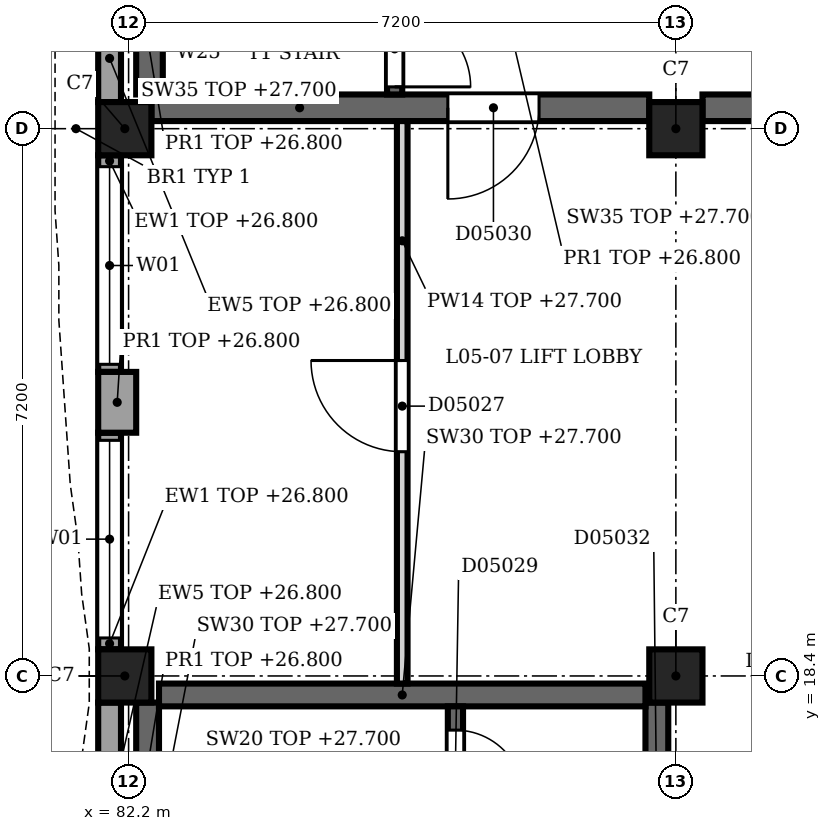
"""IFC4 building model, lengths in metres.
Left out: names, types, materials, properties, quantities, classifications, styles, units other than length and angle.
Written with IfcOpenShell. Run it as: python <this file> out.ifc"""

import sys

from ifc_helpers import new_model, si_unit, direction, frame, frame_2d, origin, origin_2d, place, context, subcontext, project, spatial, rectangle, extrude, element, fill, save


model = new_model("IFC4")
c1 = context("Model", 3, precision=1e-05, world=origin(), true_north=direction((0.0, 1.0)))
c2 = subcontext(c1, "Body", "Model", "MODEL_VIEW")
j1 = project(units=[si_unit("LENGTHUNIT", "METRE"), si_unit("PLANEANGLEUNIT", "RADIAN")], contexts=[c1])
p1 = place(None, origin())
s1 = spatial("IfcSite", under=j1, at=p1, CompositionType="ELEMENT")
p2 = place(p1, origin())
s2 = spatial("IfcBuilding", under=s1, at=p2, CompositionType="ELEMENT")
p3 = place(p2, frame((0.0, 0.0, 23.4)))
s3 = spatial("IfcBuildingStorey", under=s2, at=p3, CompositionType="ELEMENT", Elevation=23.4)
for number, where, z_axis, x_axis in (
    (1, (82.15, 18.4, 0.0), (0.0, 0.0, 1.0), (1.0, 0.0, 0.0)),
    (2, (82.15, 25.6, 0.0), (0.0, 0.0, 1.0), (1.0, 0.0, 0.0)),
    (3, (89.4, 18.4, 0.0), (0.0, 0.0, 1.0), (1.0, 0.0, 0.0)),
    (4, (89.4, 25.6, 0.0), (0.0, 0.0, 1.0), (1.0, 0.0, 0.0)),
):
    element("IfcColumn", number, at=place(p3, frame(where, z_axis=z_axis, x_axis=x_axis)), inside=s3, PredefinedType="COLUMN", context=c2, shape_type="SweptSolid", body=[
        extrude(rectangle(XDim=0.7, YDim=0.7, at=origin_2d()), origin(), (0.0, 0.0, 1.0), 4.5),
    ])
p4 = place(p3, frame((82.05, 21.6, 0.0), z_axis=(0.0, 0.0, 1.0), x_axis=(0.0, 1.0, 0.0)))
e5 = element("IfcWall", 5, at=p4, inside=s3, PredefinedType="SOLIDWALL", context=c2, shape_type="SweptSolid", body=[
    extrude(rectangle(XDim=0.8, YDim=0.5, at=frame_2d((0.4, 0.0))), origin(), (0.0, 0.0, 1.0), 3.4),
])
p5 = place(p3, frame((81.95, 15.2, 0.0), z_axis=(0.0, 0.0, 1.0), x_axis=(0.0, 1.0, 0.0)))
e6 = element("IfcWall", 6, at=p5, inside=s3, PredefinedType="SOLIDWALL", context=c2, shape_type="SweptSolid", body=[
    extrude(rectangle(XDim=2.85, YDim=0.3, at=frame_2d((1.425, 0.0))), origin(), (0.0, 0.0, 1.0), 3.4),
])
p6 = place(p3, frame((81.95, 18.75, 0.0), z_axis=(0.0, 0.0, 1.0), x_axis=(0.0, 1.0, 0.0)))
e7 = element("IfcWall", 7, at=p6, inside=s3, PredefinedType="SOLIDWALL", context=c2, shape_type="SweptSolid", body=[
    extrude(rectangle(XDim=2.85, YDim=0.3, at=frame_2d((1.425, 0.0))), origin(), (0.0, 0.0, 1.0), 3.4),
])
p7 = place(p6, frame((0.15, 0.0, 0.9)))
e8 = element("IfcOpeningElement", 8, at=p7, cuts=e7, PredefinedType="OPENING", context=c2, shape_type="SweptSolid", body=[
    extrude(rectangle(XDim=2.6, YDim=2.4, at=frame_2d((1.3, 1.2))), frame((0.0, 0.16, 0.0), z_axis=(0.0, -1.0, 0.0), x_axis=(1.0, 0.0, 0.0)), (0.0, 0.0, 1.0), 0.32),
])
p8 = place(p3, frame((81.95, 22.4, 0.0), z_axis=(0.0, 0.0, 1.0), x_axis=(0.0, 1.0, 0.0)))
e9 = element("IfcWall", 9, at=p8, inside=s3, PredefinedType="SOLIDWALL", context=c2, shape_type="SweptSolid", body=[
    extrude(rectangle(XDim=2.85, YDim=0.3, at=frame_2d((1.425, 0.0))), origin(), (0.0, 0.0, 1.0), 3.4),
])
p9 = place(p8, frame((0.1, 0.0, 0.9)))
e10 = element("IfcOpeningElement", 10, at=p9, cuts=e9, PredefinedType="OPENING", context=c2, shape_type="SweptSolid", body=[
    extrude(rectangle(XDim=2.6, YDim=2.4, at=frame_2d((1.3, 1.2))), frame((0.0, 0.16, 0.0), z_axis=(0.0, -1.0, 0.0), x_axis=(1.0, 0.0, 0.0)), (0.0, 0.0, 1.0), 0.32),
])
p10 = place(p3, frame((81.95, 25.95, 0.0), z_axis=(0.0, 0.0, 1.0), x_axis=(0.0, 1.0, 0.0)))
e11 = element("IfcWall", 11, at=p10, inside=s3, PredefinedType="SOLIDWALL", context=c2, shape_type="SweptSolid", body=[
    extrude(rectangle(XDim=2.85, YDim=0.3, at=frame_2d((1.425, 0.0))), origin(), (0.0, 0.0, 1.0), 3.4),
])
p11 = place(p10, frame((1.15, 0.0, 1.2)))
e12 = element("IfcOpeningElement", 12, at=p11, cuts=e11, PredefinedType="OPENING", context=c2, shape_type="SweptSolid", body=[
    extrude(rectangle(XDim=0.6, YDim=1.8, at=frame_2d((0.3, 0.9))), frame((0.0, 0.16, 0.0), z_axis=(0.0, -1.0, 0.0), x_axis=(1.0, 0.0, 0.0)), (0.0, 0.0, 1.0), 0.32),
])
p12 = place(p3, frame((82.5, 25.875, 0.0), z_axis=(0.0, 0.0, 1.0), x_axis=(1.0, 0.0, 0.0)))
e13 = element("IfcWall", 13, at=p12, inside=s3, PredefinedType="SHEAR", context=c2, shape_type="SweptSolid", body=[
    extrude(rectangle(XDim=6.55, YDim=0.35, at=frame_2d((3.275, 0.0))), origin(), (0.0, 0.0, 1.0), 4.3),
])
p13 = place(p12, frame((3.9, 0.0, 0.0)))
e14 = element("IfcOpeningElement", 14, at=p13, cuts=e13, PredefinedType="OPENING", context=c2, shape_type="SweptSolid", body=[
    extrude(rectangle(XDim=1.2, YDim=2.1, at=frame_2d((0.6, 1.05))), frame((0.0, 0.185, 0.0), z_axis=(0.0, -1.0, 0.0), x_axis=(1.0, 0.0, 0.0)), (0.0, 0.0, 1.0), 0.37),
])
p14 = place(p3, frame((89.75, 25.875, 0.0), z_axis=(0.0, 0.0, 1.0), x_axis=(1.0, 0.0, 0.0)))
e15 = element("IfcWall", 15, at=p14, inside=s3, PredefinedType="SHEAR", context=c2, shape_type="SweptSolid", body=[
    extrude(rectangle(XDim=6.5, YDim=0.35, at=frame_2d((3.25, 0.0))), origin(), (0.0, 0.0, 1.0), 4.3),
])
p15 = place(p14, frame((2.65, 0.0, 0.0)))
e16 = element("IfcOpeningElement", 16, at=p15, cuts=e15, PredefinedType="OPENING", context=c2, shape_type="SweptSolid", body=[
    extrude(rectangle(XDim=1.8, YDim=2.1, at=frame_2d((0.9, 1.05))), frame((0.0, 0.185, 0.0), z_axis=(0.0, -1.0, 0.0), x_axis=(1.0, 0.0, 0.0)), (0.0, 0.0, 1.0), 0.37),
])
p16 = place(p3, frame((82.475, 26.05, 0.0), z_axis=(0.0, 0.0, 1.0), x_axis=(0.0, 1.0, 0.0)))
e17 = element("IfcWall", 17, at=p16, inside=s3, PredefinedType="SHEAR", context=c2, shape_type="SweptSolid", body=[
    extrude(rectangle(XDim=6.3, YDim=0.35, at=frame_2d((3.15, 0.0))), origin(), (0.0, 0.0, 1.0), 4.3),
])
p17 = place(p16, frame((1.05, 0.0, 1.2)))
e18 = element("IfcOpeningElement", 18, at=p17, cuts=e17, PredefinedType="OPENING", context=c2, shape_type="SweptSolid", body=[
    extrude(rectangle(XDim=0.6, YDim=1.8, at=frame_2d((0.3, 0.9))), frame((0.0, 0.185, 0.0), z_axis=(0.0, -1.0, 0.0), x_axis=(1.0, 0.0, 0.0)), (0.0, 0.0, 1.0), 0.37),
])
p18 = place(p16, frame((4.65, 0.0, 1.2)))
e19 = element("IfcOpeningElement", 19, at=p18, cuts=e17, PredefinedType="OPENING", context=c2, shape_type="SweptSolid", body=[
    extrude(rectangle(XDim=0.6, YDim=1.8, at=frame_2d((0.3, 0.9))), frame((0.0, 0.185, 0.0), z_axis=(0.0, -1.0, 0.0), x_axis=(1.0, 0.0, 0.0)), (0.0, 0.0, 1.0), 0.37),
])
p19 = place(p3, frame((85.7, 26.05, 0.0), z_axis=(0.0, 0.0, 1.0), x_axis=(0.0, 1.0, 0.0)))
e20 = element("IfcWall", 20, at=p19, inside=s3, PredefinedType="SHEAR", context=c2, shape_type="SweptSolid", body=[
    extrude(rectangle(XDim=6.3, YDim=0.2, at=frame_2d((3.15, 0.0))), origin(), (0.0, 0.0, 1.0), 4.3),
])
p20 = place(p19, frame((0.1, 0.0, 0.0)))
e21 = element("IfcOpeningElement", 21, at=p20, cuts=e20, PredefinedType="OPENING", context=c2, shape_type="SweptSolid", body=[
    extrude(rectangle(XDim=1.0, YDim=2.1, at=frame_2d((0.5, 1.05))), frame((0.0, 0.11, 0.0), z_axis=(0.0, -1.0, 0.0), x_axis=(1.0, 0.0, 0.0)), (0.0, 0.0, 1.0), 0.22),
])
p21 = place(p3, frame((89.15, 11.55, 0.0), z_axis=(0.0, 0.0, 1.0), x_axis=(0.0, 1.0, 0.0)))
e22 = element("IfcWall", 22, at=p21, inside=s3, PredefinedType="SHEAR", context=c2, shape_type="SweptSolid", body=[
    extrude(rectangle(XDim=6.5, YDim=0.3, at=frame_2d((3.25, 0.0))), origin(), (0.0, 0.0, 1.0), 4.3),
])
p22 = place(p21, frame((4.25, 0.0, 0.0)))
e23 = element("IfcOpeningElement", 23, at=p22, cuts=e22, PredefinedType="OPENING", context=c2, shape_type="SweptSolid", body=[
    extrude(rectangle(XDim=1.2, YDim=2.1, at=frame_2d((0.6, 1.05))), frame((0.0, 0.16, 0.0), z_axis=(0.0, -1.0, 0.0), x_axis=(1.0, 0.0, 0.0)), (0.0, 0.0, 1.0), 0.32),
])
p23 = place(p3, frame((82.45, 11.55, 0.0), z_axis=(0.0, 0.0, 1.0), x_axis=(0.0, 1.0, 0.0)))
e24 = element("IfcWall", 24, at=p23, inside=s3, PredefinedType="SHEAR", context=c2, shape_type="SweptSolid", body=[
    extrude(rectangle(XDim=6.5, YDim=0.3, at=frame_2d((3.25, 0.0))), origin(), (0.0, 0.0, 1.0), 4.3),
])
p24 = place(p23, frame((1.15, 0.0, 1.2)))
e25 = element("IfcOpeningElement", 25, at=p24, cuts=e24, PredefinedType="OPENING", context=c2, shape_type="SweptSolid", body=[
    extrude(rectangle(XDim=0.6, YDim=1.8, at=frame_2d((0.3, 0.9))), frame((0.0, 0.16, 0.0), z_axis=(0.0, -1.0, 0.0), x_axis=(1.0, 0.0, 0.0)), (0.0, 0.0, 1.0), 0.32),
])
p25 = place(p3, frame((82.6, 18.15, 0.0), z_axis=(0.0, 0.0, 1.0), x_axis=(1.0, 0.0, 0.0)))
e26 = element("IfcWall", 26, at=p25, inside=s3, PredefinedType="SHEAR", context=c2, shape_type="SweptSolid", body=[
    extrude(rectangle(XDim=6.4, YDim=0.3, at=frame_2d((3.2, 0.0))), origin(), (0.0, 0.0, 1.0), 4.3),
])
p26 = place(p3, frame((86.5, 18.0, 0.0), z_axis=(0.0, 0.0, 1.0), x_axis=(0.0, -1.0, 0.0)))
e27 = element("IfcWall", 27, at=p26, inside=s3, PredefinedType="SHEAR", context=c2, shape_type="SweptSolid", body=[
    extrude(rectangle(XDim=3.25, YDim=0.2, at=frame_2d((1.625, 0.0))), origin(), (0.0, 0.0, 1.0), 4.3),
])
p27 = place(p26, frame((2.038, 0.0, 0.0)))
e28 = element("IfcOpeningElement", 28, at=p27, cuts=e27, PredefinedType="OPENING", context=c2, shape_type="SweptSolid", body=[
    extrude(rectangle(XDim=0.9, YDim=2.1, at=frame_2d((0.45, 1.05))), frame((0.0, 0.11, 0.0), z_axis=(0.0, -1.0, 0.0), x_axis=(1.0, 0.0, 0.0)), (0.0, 0.0, 1.0), 0.22),
])
p28 = place(p26, frame((0.312, 0.0, 0.0)))
e29 = element("IfcOpeningElement", 29, at=p28, cuts=e27, PredefinedType="OPENING", context=c2, shape_type="SweptSolid", body=[
    extrude(rectangle(XDim=0.9, YDim=2.1, at=frame_2d((0.45, 1.05))), frame((0.0, 0.11, 0.0), z_axis=(0.0, -1.0, 0.0), x_axis=(1.0, 0.0, 0.0)), (0.0, 0.0, 1.0), 0.22),
])
p29 = place(p3, frame((85.8, 18.3, 0.0), z_axis=(0.0, 0.0, 1.0), x_axis=(0.0, 1.0, 0.0)))
e30 = element("IfcWall", 30, at=p29, inside=s3, PredefinedType="PARTITIONING", context=c2, shape_type="SweptSolid", body=[
    extrude(rectangle(XDim=7.4, YDim=0.14, at=frame_2d((3.7, 0.0))), origin(), (0.0, 0.0, 1.0), 4.3),
])
p30 = place(p29, frame((3.05, 0.0, 0.0)))
e31 = element("IfcOpeningElement", 31, at=p30, cuts=e30, PredefinedType="OPENING", context=c2, shape_type="SweptSolid", body=[
    extrude(rectangle(XDim=1.2, YDim=2.2, at=frame_2d((0.6, 1.1))), frame((0.0, 0.08, 0.0), z_axis=(0.0, -1.0, 0.0), x_axis=(1.0, 0.0, 0.0)), (0.0, 0.0, 1.0), 0.16),
])
p31 = place(p7, origin())
e32 = element("IfcWindow", 32, at=p31, inside=s3, PartitioningType="SINGLE_PANEL", PredefinedType="WINDOW", context=c2, shape_type="SweptSolid", body=[
    extrude(rectangle(XDim=2.6, YDim=2.4, at=frame_2d((1.3, 1.2))), frame((0.0, 0.03, 0.0), z_axis=(0.0, -1.0, 0.0), x_axis=(1.0, 0.0, 0.0)), (0.0, 0.0, 1.0), 0.06),
])
fill(e8, e32)
p32 = place(p9, origin())
e33 = element("IfcWindow", 33, at=p32, inside=s3, PartitioningType="SINGLE_PANEL", PredefinedType="WINDOW", context=c2, shape_type="SweptSolid", body=[
    extrude(rectangle(XDim=2.6, YDim=2.4, at=frame_2d((1.3, 1.2))), frame((0.0, 0.03, 0.0), z_axis=(0.0, -1.0, 0.0), x_axis=(1.0, 0.0, 0.0)), (0.0, 0.0, 1.0), 0.06),
])
fill(e10, e33)
p33 = place(p13, origin())
e34 = element("IfcDoor", 34, at=p33, inside=s3, OperationType="SINGLE_SWING_RIGHT", PredefinedType="DOOR", context=c2, shape_type="SweptSolid", body=[
    extrude(rectangle(XDim=1.2, YDim=2.1, at=frame_2d((0.6, 1.05))), frame((0.0, 0.025, 0.0), z_axis=(0.0, -1.0, 0.0), x_axis=(1.0, 0.0, 0.0)), (0.0, 0.0, 1.0), 0.05),
])
fill(e14, e34)
p34 = place(p20, origin())
e35 = element("IfcDoor", 35, at=p34, inside=s3, OperationType="SINGLE_SWING_LEFT", PredefinedType="DOOR", context=c2, shape_type="SweptSolid", body=[
    extrude(rectangle(XDim=1.0, YDim=2.1, at=frame_2d((0.5, 1.05))), frame((0.0, 0.025, 0.0), z_axis=(0.0, -1.0, 0.0), x_axis=(1.0, 0.0, 0.0)), (0.0, 0.0, 1.0), 0.05),
])
fill(e21, e35)
p35 = place(p28, origin())
e36 = element("IfcDoor", 36, at=p35, inside=s3, OperationType="SINGLE_SWING_LEFT", PredefinedType="DOOR", context=c2, shape_type="SweptSolid", body=[
    extrude(rectangle(XDim=0.9, YDim=2.1, at=frame_2d((0.45, 1.05))), frame((0.0, 0.025, 0.0), z_axis=(0.0, -1.0, 0.0), x_axis=(1.0, 0.0, 0.0)), (0.0, 0.0, 1.0), 0.05),
])
fill(e29, e36)
p36 = place(p30, origin())
e37 = element("IfcDoor", 37, at=p36, inside=s3, OperationType="SINGLE_SWING_LEFT", PredefinedType="DOOR", context=c2, shape_type="SweptSolid", body=[
    extrude(rectangle(XDim=1.2, YDim=2.2, at=frame_2d((0.6, 1.1))), frame((0.0, 0.025, 0.0), z_axis=(0.0, -1.0, 0.0), x_axis=(1.0, 0.0, 0.0)), (0.0, 0.0, 1.0), 0.05),
])
fill(e31, e37)
save(model, sys.argv[1])
